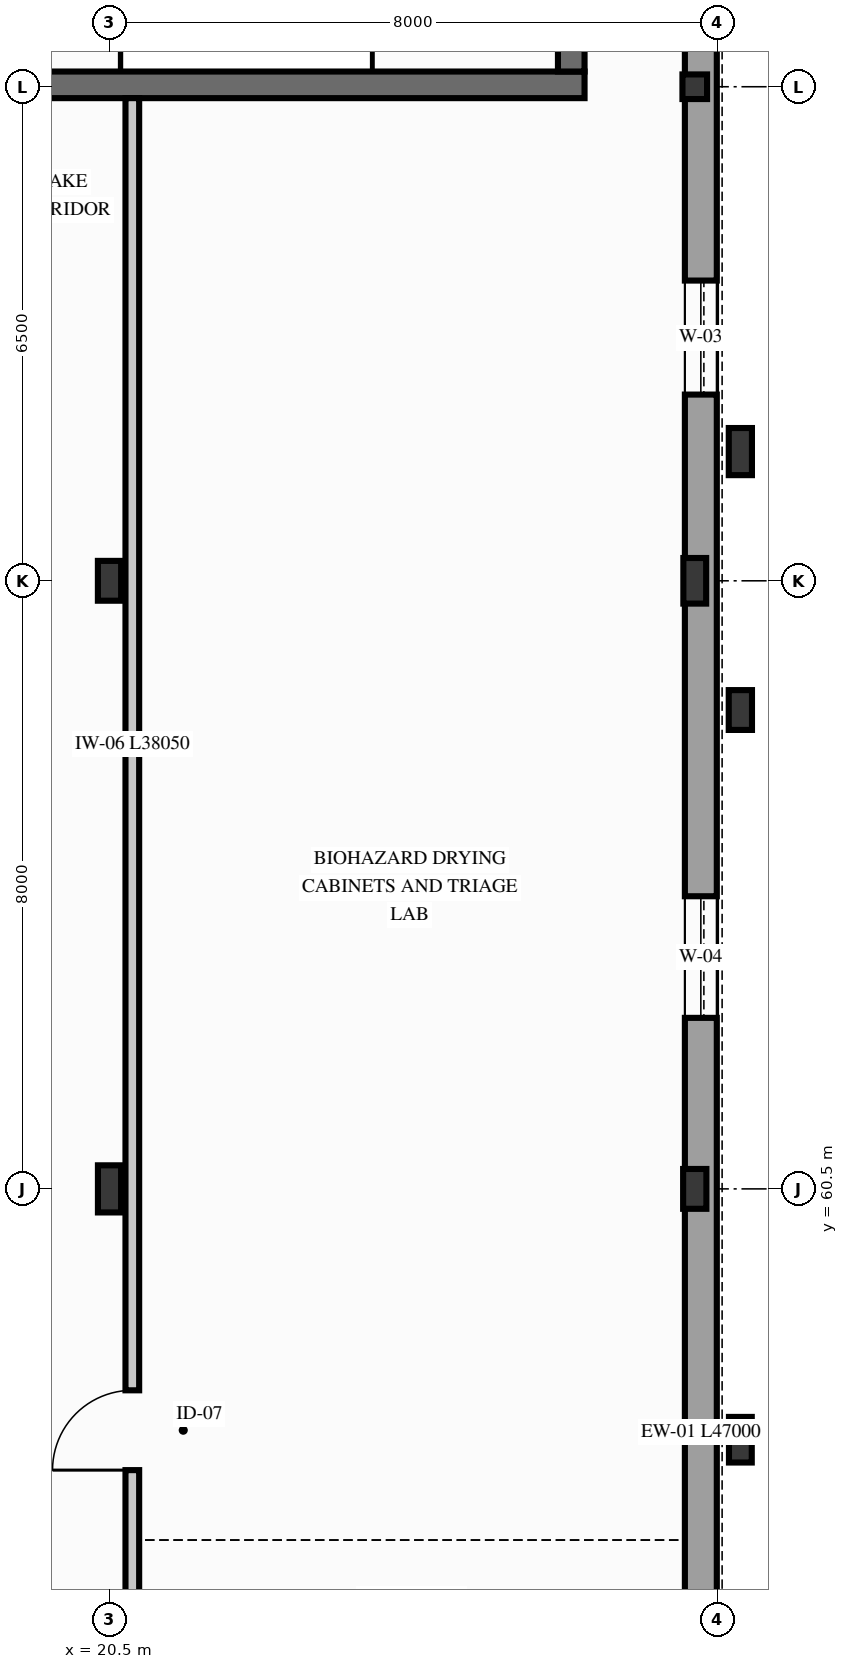
"""IFC4 building model, lengths in metres.
Left out: names, types, materials, properties, quantities, classifications, styles, units other than length and angle.
Written with IfcOpenShell. Run it as: python <this file> out.ifc"""

import sys

from ifc_helpers import new_model, si_unit, direction, frame, frame_2d, origin, origin_2d, place, context, subcontext, project, spatial, rectangle, hollow_circle, i_section, extrude, element, fill, save


model = new_model("IFC4")
c1 = context("Model", 3, precision=1e-05, world=origin(), true_north=direction((0.0, 1.0)))
c2 = subcontext(c1, "Body", "Model", "MODEL_VIEW")
j1 = project(units=[si_unit("LENGTHUNIT", "METRE"), si_unit("PLANEANGLEUNIT", "RADIAN")], contexts=[c1])
p1 = place(None, origin())
s1 = spatial("IfcSite", under=j1, at=p1, CompositionType="ELEMENT")
p2 = place(p1, origin())
s2 = spatial("IfcBuilding", under=s1, at=p2, CompositionType="ELEMENT")
p3 = place(p2, frame((0.0, 0.0, 5.1)))
s3 = spatial("IfcBuildingStorey", under=s2, at=p3, CompositionType="ELEMENT", Elevation=5.1)
p4 = place(p3, frame((18.45, 75.025, 0.0), z_axis=(0.0, 0.0, 1.0), x_axis=(1.0, 0.0, 0.0)))
e1 = element("IfcWall", 1, at=p4, inside=s3, PredefinedType="SHEAR", context=c2, shape_type="SweptSolid", body=[
    extrude(rectangle(XDim=8.3, YDim=0.35, at=frame_2d((4.15, 0.0))), origin(), (0.0, 0.0, 1.0), 3.98),
])
p5 = place(p3, frame((26.575, 75.2, 0.0), z_axis=(0.0, 0.0, 1.0), x_axis=(0.0, 1.0, 0.0)))
e2 = element("IfcWall", 2, at=p5, inside=s3, PredefinedType="SHEAR", context=c2, shape_type="SweptSolid", body=[
    extrude(rectangle(XDim=6.8, YDim=0.35, at=frame_2d((3.4, 0.0))), origin(), (0.0, 0.0, 1.0), 3.98),
])
p6 = place(p3, frame((28.8, 57.2, 0.0), z_axis=(0.0, 0.0, 1.0), x_axis=(1.0, 0.0, 0.0)))
e3 = element("IfcColumn", 3, at=p6, inside=s3, PredefinedType="COLUMN", context=c2, shape_type="SweptSolid", body=[
    extrude(i_section(OverallWidth=0.3, OverallDepth=0.6, WebThickness=0.015, FlangeThickness=0.03, FilletRadius=0.027, at=origin_2d()), origin(), (0.0, 0.0, 1.0), 4.2),
])
p7 = place(p3, frame((28.8, 70.2, 0.0), z_axis=(0.0, 0.0, 1.0), x_axis=(1.0, 0.0, 0.0)))
e4 = element("IfcColumn", 4, at=p7, inside=s3, PredefinedType="COLUMN", context=c2, shape_type="SweptSolid", body=[
    extrude(i_section(OverallWidth=0.305, OverallDepth=0.62, WebThickness=0.021, FlangeThickness=0.04, FilletRadius=0.027, at=origin_2d()), origin(), (0.0, 0.0, 1.0), 4.2),
])
p8 = place(p3, frame((28.8, 66.8, 0.0), z_axis=(0.0, 0.0, 1.0), x_axis=(1.0, 0.0, 0.0)))
e5 = element("IfcColumn", 5, at=p8, inside=s3, PredefinedType="COLUMN", context=c2, shape_type="SweptSolid", body=[
    extrude(i_section(OverallWidth=0.306, OverallDepth=0.524, WebThickness=0.021, FlangeThickness=0.04, FilletRadius=0.027, at=origin_2d()), origin(), (0.0, 0.0, 1.0), 4.2),
])
p9 = place(p3, frame((20.5, 60.5, 0.0), z_axis=(0.0, 0.0, 1.0), x_axis=(1.0, 0.0, 0.0)))
e6 = element("IfcColumn", 6, at=p9, inside=s3, PredefinedType="COLUMN", context=c2, shape_type="SweptSolid", body=[
    extrude(i_section(OverallWidth=0.305, OverallDepth=0.62, WebThickness=0.021, FlangeThickness=0.04, FilletRadius=0.027, at=origin_2d()), origin(), (0.0, 0.0, 1.0), 4.2),
])
for number, where, z_axis, x_axis in (
    (7, (20.5, 68.5, 0.0), (0.0, 0.0, 1.0), (1.0, 0.0, 0.0)),
    (8, (28.2, 60.5, 0.0), (0.0, 0.0, 1.0), (1.0, 0.0, 0.0)),
):
    element("IfcColumn", number, at=place(p3, frame(where, z_axis=z_axis, x_axis=x_axis)), inside=s3, PredefinedType="COLUMN", context=c2, shape_type="SweptSolid", body=[
        extrude(i_section(OverallWidth=0.306, OverallDepth=0.524, WebThickness=0.021, FlangeThickness=0.04, FilletRadius=0.027, at=origin_2d()), origin(), (0.0, 0.0, 1.0), 4.2),
    ])
p10 = place(p3, frame((28.2, 68.5, 0.0), z_axis=(0.0, 0.0, 1.0), x_axis=(1.0, 0.0, 0.0)))
e9 = element("IfcColumn", 9, at=p10, inside=s3, PredefinedType="COLUMN", context=c2, shape_type="SweptSolid", body=[
    extrude(i_section(OverallWidth=0.3, OverallDepth=0.6, WebThickness=0.015, FlangeThickness=0.03, FilletRadius=0.027, at=origin_2d()), origin(), (0.0, 0.0, 1.0), 4.2),
])
p11 = place(p3, frame((28.2, 75.0, 0.0), z_axis=(0.0, 0.0, 1.0), x_axis=(1.0, 0.0, 0.0)))
e10 = element("IfcColumn", 10, at=p11, inside=s3, PredefinedType="COLUMN", context=c2, shape_type="SweptSolid", body=[
    extrude(hollow_circle(Radius=0.162, WallThickness=0.016, at=origin_2d()), origin(), (0.0, 0.0, 1.0), 4.2),
])
p12 = place(p3, frame((28.28, 36.5, 0.0), z_axis=(0.0, 0.0, 1.0), x_axis=(0.0, 1.0, 0.0)))
e11 = element("IfcWall", 11, at=p12, inside=s3, PredefinedType="SOLIDWALL", context=c2, shape_type="SweptSolid", body=[
    extrude(rectangle(XDim=47.0, YDim=0.42, at=frame_2d((23.5, 0.0))), origin(), (0.0, 0.0, 1.0), 3.66),
])
p13 = place(p12, frame((1.65, 0.0, 0.74)))
e12 = element("IfcOpeningElement", 12, at=p13, cuts=e11, PredefinedType="OPENING", context=c2, shape_type="SweptSolid", body=[
    extrude(rectangle(XDim=1.6, YDim=2.4, at=frame_2d((0.8, 1.2))), frame((0.0, 0.22, 0.0), z_axis=(0.0, -1.0, 0.0), x_axis=(1.0, 0.0, 0.0)), (0.0, 0.0, 1.0), 0.44),
])
p14 = place(p12, frame((5.75, 0.0, 0.74)))
e13 = element("IfcOpeningElement", 13, at=p14, cuts=e11, PredefinedType="OPENING", context=c2, shape_type="SweptSolid", body=[
    extrude(rectangle(XDim=1.8, YDim=2.4, at=frame_2d((0.9, 1.2))), frame((0.0, 0.22, 0.0), z_axis=(0.0, -1.0, 0.0), x_axis=(1.0, 0.0, 0.0)), (0.0, 0.0, 1.0), 0.44),
])
p15 = place(p12, frame((9.85, 0.0, 0.84)))
e14 = element("IfcOpeningElement", 14, at=p15, cuts=e11, PredefinedType="OPENING", context=c2, shape_type="SweptSolid", body=[
    extrude(rectangle(XDim=1.5, YDim=2.3, at=frame_2d((0.75, 1.15))), frame((0.0, 0.22, 0.0), z_axis=(0.0, -1.0, 0.0), x_axis=(1.0, 0.0, 0.0)), (0.0, 0.0, 1.0), 0.44),
])
p16 = place(p12, frame((13.95, 0.0, 0.85)))
e15 = element("IfcOpeningElement", 15, at=p16, cuts=e11, PredefinedType="OPENING", context=c2, shape_type="SweptSolid", body=[
    extrude(rectangle(XDim=1.4, YDim=2.2, at=frame_2d((0.7, 1.1))), frame((0.0, 0.22, 0.0), z_axis=(0.0, -1.0, 0.0), x_axis=(1.0, 0.0, 0.0)), (0.0, 0.0, 1.0), 0.44),
])
p17 = place(p12, frame((26.25, 0.0, 0.74)))
e16 = element("IfcOpeningElement", 16, at=p17, cuts=e11, PredefinedType="OPENING", context=c2, shape_type="SweptSolid", body=[
    extrude(rectangle(XDim=1.6, YDim=2.4, at=frame_2d((0.8, 1.2))), frame((0.0, 0.22, 0.0), z_axis=(0.0, -1.0, 0.0), x_axis=(1.0, 0.0, 0.0)), (0.0, 0.0, 1.0), 0.44),
])
p18 = place(p12, frame((34.45, 0.0, 0.84)))
e17 = element("IfcOpeningElement", 17, at=p18, cuts=e11, PredefinedType="OPENING", context=c2, shape_type="SweptSolid", body=[
    extrude(rectangle(XDim=1.5, YDim=2.3, at=frame_2d((0.75, 1.15))), frame((0.0, 0.22, 0.0), z_axis=(0.0, -1.0, 0.0), x_axis=(1.0, 0.0, 0.0)), (0.0, 0.0, 1.0), 0.44),
])
p19 = place(p12, frame((42.65, 0.0, 0.54)))
e18 = element("IfcOpeningElement", 18, at=p19, cuts=e11, PredefinedType="OPENING", context=c2, shape_type="SweptSolid", body=[
    extrude(rectangle(XDim=2.2, YDim=2.6, at=frame_2d((1.1, 1.3))), frame((0.0, 0.22, 0.0), z_axis=(0.0, -1.0, 0.0), x_axis=(1.0, 0.0, 0.0)), (0.0, 0.0, 1.0), 0.44),
])
p20 = place(p3, frame((20.8, 36.8, 0.0), z_axis=(0.0, 0.0, 1.0), x_axis=(0.0, 1.0, 0.0)))
e19 = element("IfcWall", 19, at=p20, inside=s3, PredefinedType="PARTITIONING", context=c2, shape_type="SweptSolid", body=[
    extrude(rectangle(XDim=38.05, YDim=0.18, at=frame_2d((19.025, 0.0))), origin(), (0.0, 0.0, 1.0), 3.658),
])
p21 = place(p20, frame((5.65, 0.0, 0.0)))
e20 = element("IfcOpeningElement", 20, at=p21, cuts=e19, PredefinedType="OPENING", context=c2, shape_type="SweptSolid", body=[
    extrude(rectangle(XDim=1.08, YDim=2.22, at=frame_2d((0.54, 1.11))), frame((0.0, 0.1, 0.0), z_axis=(0.0, -1.0, 0.0), x_axis=(1.0, 0.0, 0.0)), (0.0, 0.0, 1.0), 0.2),
])
p22 = place(p20, frame((20.0, 0.0, 0.0)))
e21 = element("IfcOpeningElement", 21, at=p22, cuts=e19, PredefinedType="OPENING", context=c2, shape_type="SweptSolid", body=[
    extrude(rectangle(XDim=1.05, YDim=2.2, at=frame_2d((0.525, 1.1))), frame((0.0, 0.1, 0.0), z_axis=(0.0, -1.0, 0.0), x_axis=(1.0, 0.0, 0.0)), (0.0, 0.0, 1.0), 0.2),
])
p23 = place(p17, origin())
e22 = element("IfcWindow", 22, at=p23, inside=s3, PartitioningType="SINGLE_PANEL", PredefinedType="WINDOW", context=c2, shape_type="SweptSolid", body=[
    extrude(rectangle(XDim=1.6, YDim=2.4, at=frame_2d((0.8, 1.2))), frame((0.0, 0.03, 0.0), z_axis=(0.0, -1.0, 0.0), x_axis=(1.0, 0.0, 0.0)), (0.0, 0.0, 1.0), 0.06),
])
fill(e16, e22)
p24 = place(p18, origin())
e23 = element("IfcWindow", 23, at=p24, inside=s3, PartitioningType="SINGLE_PANEL", PredefinedType="WINDOW", context=c2, shape_type="SweptSolid", body=[
    extrude(rectangle(XDim=1.5, YDim=2.3, at=frame_2d((0.75, 1.15))), frame((0.0, 0.03, 0.0), z_axis=(0.0, -1.0, 0.0), x_axis=(1.0, 0.0, 0.0)), (0.0, 0.0, 1.0), 0.06),
])
fill(e17, e23)
p25 = place(p22, origin())
e24 = element("IfcDoor", 24, at=p25, inside=s3, OperationType="SINGLE_SWING_LEFT", PredefinedType="DOOR", context=c2, shape_type="SweptSolid", body=[
    extrude(rectangle(XDim=1.05, YDim=2.2, at=frame_2d((0.525, 1.1))), frame((0.0, 0.025, 0.0), z_axis=(0.0, -1.0, 0.0), x_axis=(1.0, 0.0, 0.0)), (0.0, 0.0, 1.0), 0.05),
])
fill(e21, e24)
save(model, sys.argv[1])
